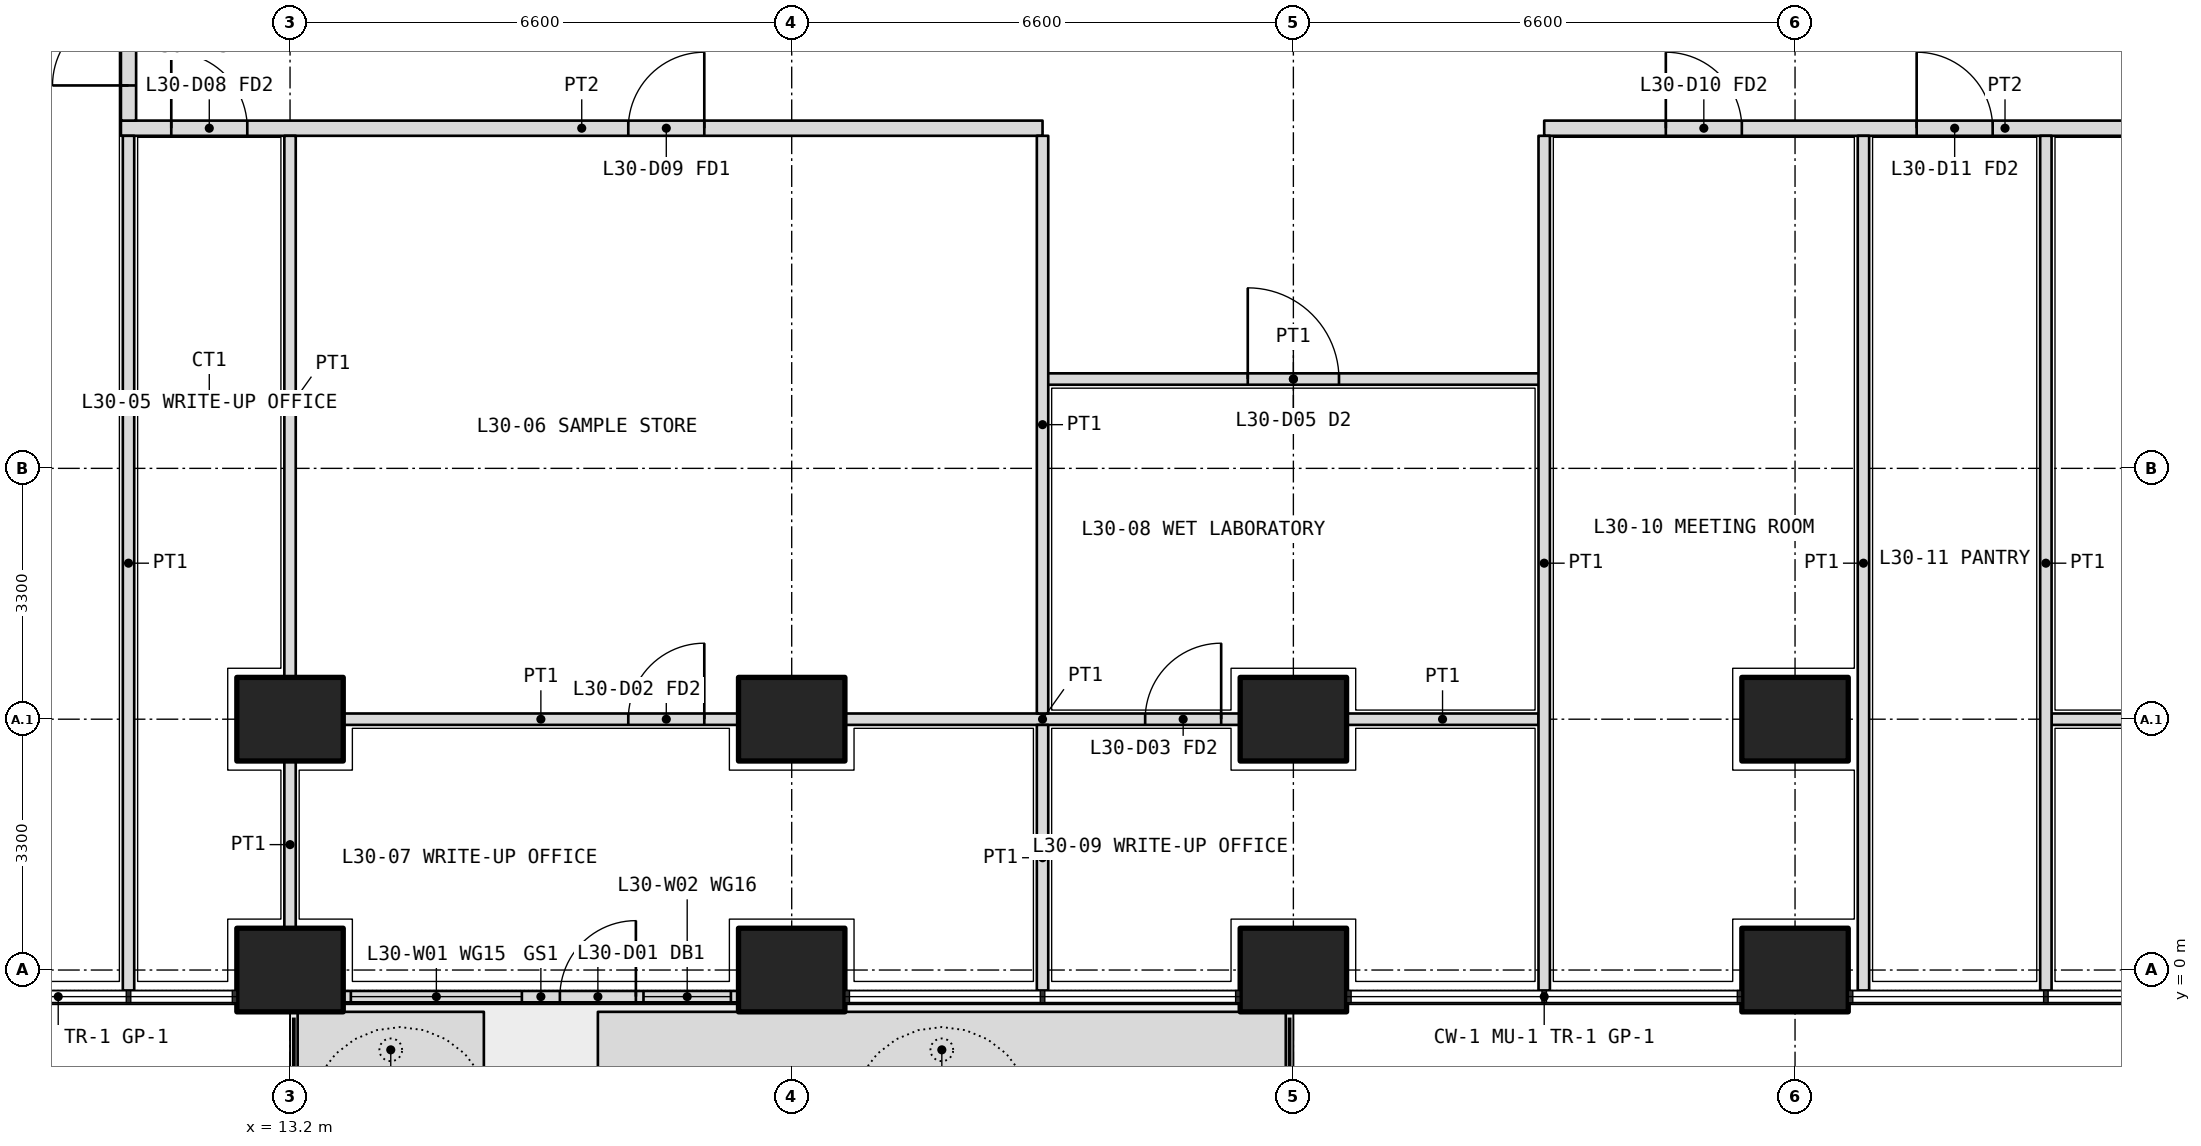
"""IFC4 building model, lengths in metres.
Left out: names, types, materials, properties, quantities, classifications, styles, units other than length and angle.
Written with IfcOpenShell. Run it as: python <this file> out.ifc"""

import sys

from ifc_helpers import new_model, si_unit, direction, frame, frame_2d, origin, origin_2d, place, context, subcontext, project, spatial, polyline, rectangle, outline, extrude, element, fill, save


model = new_model("IFC4")
c1 = context("Model", 3, precision=1e-05, world=origin(), true_north=direction((0.0, 1.0)))
c2 = subcontext(c1, "Body", "Model", "MODEL_VIEW")
j1 = project(units=[si_unit("LENGTHUNIT", "METRE"), si_unit("PLANEANGLEUNIT", "RADIAN")], contexts=[c1])
p1 = place(None, origin())
s1 = spatial("IfcSite", under=j1, at=p1, CompositionType="ELEMENT")
p2 = place(p1, origin())
s2 = spatial("IfcBuilding", under=s1, at=p2, CompositionType="ELEMENT")
p3 = place(p2, frame((0.0, 0.0, 132.6)))
s3 = spatial("IfcBuildingStorey", under=s2, at=p3, CompositionType="ELEMENT", Elevation=132.6)
for number, where, z_axis, x_axis in (
    (1, (13.2, 0.0, 0.0), (0.0, 0.0, 1.0), (1.0, 0.0, 0.0)),
    (2, (19.8, 0.0, 0.0), (0.0, 0.0, 1.0), (1.0, 0.0, 0.0)),
    (3, (26.4, 0.0, 0.0), (0.0, 0.0, 1.0), (1.0, 0.0, 0.0)),
    (4, (33.0, 0.0, 0.0), (0.0, 0.0, 1.0), (1.0, 0.0, 0.0)),
    (5, (13.2, 3.3, 0.0), (0.0, 0.0, 1.0), (1.0, 0.0, 0.0)),
    (6, (19.8, 3.3, 0.0), (0.0, 0.0, 1.0), (1.0, 0.0, 0.0)),
    (7, (26.4, 3.3, 0.0), (0.0, 0.0, 1.0), (1.0, 0.0, 0.0)),
    (8, (33.0, 3.3, 0.0), (0.0, 0.0, 1.0), (1.0, 0.0, 0.0)),
):
    element("IfcColumn", number, at=place(p3, frame(where, z_axis=z_axis, x_axis=x_axis)), inside=s3, PredefinedType="COLUMN", context=c2, shape_type="SweptSolid", body=[
        extrude(rectangle(XDim=1.4, YDim=1.1, at=origin_2d()), origin(), (0.0, 0.0, 1.0), 4.2),
    ])
p4 = place(p3, origin())
e9 = element("IfcWall", 9, at=p4, inside=s3, PredefinedType="USERDEFINED", context=c2, shape_type="SweptSolid", body=[
    extrude(outline(polyline([(13.3, -1.55), (15.75, -1.55), (15.75, -0.55), (13.3, -0.55), (13.3, -1.55)]), holes=[polyline([(13.45, -1.4), (15.6, -1.4), (15.6, -0.7), (13.45, -0.7), (13.45, -1.4)])]), origin(), (0.0, 0.0, 1.0), 1.05),
])
p5 = place(p3, origin())
e10 = element("IfcWall", 10, at=p5, inside=s3, PredefinedType="USERDEFINED", context=c2, shape_type="SweptSolid", body=[
    extrude(outline(polyline([(17.25, -1.55), (26.3, -1.55), (26.3, -0.55), (17.25, -0.55), (17.25, -1.55)]), holes=[polyline([(17.4, -1.4), (26.15, -1.4), (26.15, -0.7), (17.4, -0.7), (17.4, -1.4)])]), origin(), (0.0, 0.0, 1.0), 1.05),
])
p6 = place(p3, frame((13.9, -0.35, 0.0), z_axis=(0.0, 0.0, 1.0), x_axis=(1.0, 0.0, 0.0)))
e11 = element("IfcWall", 11, at=p6, inside=s3, PredefinedType="SOLIDWALL", context=c2, shape_type="SweptSolid", body=[
    extrude(rectangle(XDim=5.2, YDim=0.15, at=frame_2d((2.6, 0.0))), origin(), (0.0, 0.0, 1.0), 2.7),
])
p7 = place(p6, frame((2.85, 0.0, 0.0)))
e12 = element("IfcOpeningElement", 12, at=p7, cuts=e11, PredefinedType="OPENING", context=c2, shape_type="SweptSolid", body=[
    extrude(rectangle(XDim=1.0, YDim=2.4, at=frame_2d((0.5, 1.2))), frame((0.0, 0.085, 0.0), z_axis=(0.0, -1.0, 0.0), x_axis=(1.0, 0.0, 0.0)), (0.0, 0.0, 1.0), 0.17),
])
p8 = place(p6, frame((0.1, 0.0, 0.1)))
e13 = element("IfcOpeningElement", 13, at=p8, cuts=e11, PredefinedType="OPENING", context=c2, shape_type="SweptSolid", body=[
    extrude(rectangle(XDim=2.25, YDim=2.3, at=frame_2d((1.125, 1.15))), frame((0.0, 0.085, 0.0), z_axis=(0.0, -1.0, 0.0), x_axis=(1.0, 0.0, 0.0)), (0.0, 0.0, 1.0), 0.17),
])
p9 = place(p6, frame((3.95, 0.0, 0.1)))
e14 = element("IfcOpeningElement", 14, at=p9, cuts=e11, PredefinedType="OPENING", context=c2, shape_type="SweptSolid", body=[
    extrude(rectangle(XDim=1.15, YDim=2.3, at=frame_2d((0.575, 1.15))), frame((0.0, 0.085, 0.0), z_axis=(0.0, -1.0, 0.0), x_axis=(1.0, 0.0, 0.0)), (0.0, 0.0, 1.0), 0.17),
])
p10 = place(p3, frame((10.975, 11.075, 0.0), z_axis=(0.0, 0.0, 1.0), x_axis=(1.0, 0.0, 0.0)))
e15 = element("IfcWall", 15, at=p10, inside=s3, PredefinedType="PARTITIONING", context=c2, shape_type="SweptSolid", body=[
    extrude(rectangle(XDim=12.125, YDim=0.2, at=frame_2d((6.062, 0.0))), origin(), (0.0, 0.0, 1.0), 2.85),
])
p11 = place(p10, frame((0.663, 0.0, 0.0)))
e16 = element("IfcOpeningElement", 16, at=p11, cuts=e15, PredefinedType="OPENING", context=c2, shape_type="SweptSolid", body=[
    extrude(rectangle(XDim=1.0, YDim=2.1, at=frame_2d((0.5, 1.05))), frame((0.0, 0.11, 0.0), z_axis=(0.0, -1.0, 0.0), x_axis=(1.0, 0.0, 0.0)), (0.0, 0.0, 1.0), 0.22),
])
p12 = place(p10, frame((6.675, 0.0, 0.0)))
e17 = element("IfcOpeningElement", 17, at=p12, cuts=e15, PredefinedType="OPENING", context=c2, shape_type="SweptSolid", body=[
    extrude(rectangle(XDim=1.0, YDim=2.1, at=frame_2d((0.5, 1.05))), frame((0.0, 0.11, 0.0), z_axis=(0.0, -1.0, 0.0), x_axis=(1.0, 0.0, 0.0)), (0.0, 0.0, 1.0), 0.22),
])
p13 = place(p3, frame((29.7, 11.075, 0.0), z_axis=(0.0, 0.0, 1.0), x_axis=(1.0, 0.0, 0.0)))
e18 = element("IfcWall", 18, at=p13, inside=s3, PredefinedType="PARTITIONING", context=c2, shape_type="SweptSolid", body=[
    extrude(rectangle(XDim=12.125, YDim=0.2, at=frame_2d((6.062, 0.0))), origin(), (0.0, 0.0, 1.0), 2.85),
])
p14 = place(p13, frame((1.6, 0.0, 0.0)))
e19 = element("IfcOpeningElement", 19, at=p14, cuts=e18, PredefinedType="OPENING", context=c2, shape_type="SweptSolid", body=[
    extrude(rectangle(XDim=1.0, YDim=2.1, at=frame_2d((0.5, 1.05))), frame((0.0, 0.11, 0.0), z_axis=(0.0, -1.0, 0.0), x_axis=(1.0, 0.0, 0.0)), (0.0, 0.0, 1.0), 0.22),
])
p15 = place(p13, frame((4.9, 0.0, 0.0)))
e20 = element("IfcOpeningElement", 20, at=p15, cuts=e18, PredefinedType="OPENING", context=c2, shape_type="SweptSolid", body=[
    extrude(rectangle(XDim=1.0, YDim=2.1, at=frame_2d((0.5, 1.05))), frame((0.0, 0.11, 0.0), z_axis=(0.0, -1.0, 0.0), x_axis=(1.0, 0.0, 0.0)), (0.0, 0.0, 1.0), 0.22),
])
p16 = place(p13, frame((8.812, 0.0, 0.0)))
e21 = element("IfcOpeningElement", 21, at=p16, cuts=e18, PredefinedType="OPENING", context=c2, shape_type="SweptSolid", body=[
    extrude(rectangle(XDim=1.0, YDim=2.1, at=frame_2d((0.5, 1.05))), frame((0.0, 0.11, 0.0), z_axis=(0.0, -1.0, 0.0), x_axis=(1.0, 0.0, 0.0)), (0.0, 0.0, 1.0), 0.22),
])
p17 = place(p3, frame((11.075, 11.175, 0.0), z_axis=(0.0, 0.0, 1.0), x_axis=(0.0, 1.0, 0.0)))
e22 = element("IfcWall", 22, at=p17, inside=s3, PredefinedType="PARTITIONING", context=c2, shape_type="SweptSolid", body=[
    extrude(rectangle(XDim=27.625, YDim=0.2, at=frame_2d((13.812, 0.0))), origin(), (0.0, 0.0, 1.0), 2.85),
])
p18 = place(p17, frame((0.462, 0.0, 0.0)))
e23 = element("IfcOpeningElement", 23, at=p18, cuts=e22, PredefinedType="OPENING", context=c2, shape_type="SweptSolid", body=[
    extrude(rectangle(XDim=1.0, YDim=2.1, at=frame_2d((0.5, 1.05))), frame((0.0, 0.11, 0.0), z_axis=(0.0, -1.0, 0.0), x_axis=(1.0, 0.0, 0.0)), (0.0, 0.0, 1.0), 0.22),
])
p19 = place(p17, frame((2.575, 0.0, 0.0)))
e24 = element("IfcOpeningElement", 24, at=p19, cuts=e22, PredefinedType="OPENING", context=c2, shape_type="SweptSolid", body=[
    extrude(rectangle(XDim=1.0, YDim=2.1, at=frame_2d((0.5, 1.05))), frame((0.0, 0.11, 0.0), z_axis=(0.0, -1.0, 0.0), x_axis=(1.0, 0.0, 0.0)), (0.0, 0.0, 1.0), 0.22),
])
p20 = place(p17, frame((5.625, 0.0, 0.0)))
e25 = element("IfcOpeningElement", 25, at=p20, cuts=e22, PredefinedType="OPENING", context=c2, shape_type="SweptSolid", body=[
    extrude(rectangle(XDim=0.9, YDim=2.1, at=frame_2d((0.45, 1.05))), frame((0.0, 0.11, 0.0), z_axis=(0.0, -1.0, 0.0), x_axis=(1.0, 0.0, 0.0)), (0.0, 0.0, 1.0), 0.22),
])
p21 = place(p17, frame((9.425, 0.0, 0.0)))
e26 = element("IfcOpeningElement", 26, at=p21, cuts=e22, PredefinedType="OPENING", context=c2, shape_type="SweptSolid", body=[
    extrude(rectangle(XDim=0.9, YDim=2.1, at=frame_2d((0.45, 1.05))), frame((0.0, 0.11, 0.0), z_axis=(0.0, -1.0, 0.0), x_axis=(1.0, 0.0, 0.0)), (0.0, 0.0, 1.0), 0.22),
])
p22 = place(p17, frame((12.975, 0.0, 0.0)))
e27 = element("IfcOpeningElement", 27, at=p22, cuts=e22, PredefinedType="OPENING", context=c2, shape_type="SweptSolid", body=[
    extrude(rectangle(XDim=1.0, YDim=2.1, at=frame_2d((0.5, 1.05))), frame((0.0, 0.11, 0.0), z_axis=(0.0, -1.0, 0.0), x_axis=(1.0, 0.0, 0.0)), (0.0, 0.0, 1.0), 0.22),
])
p23 = place(p17, frame((19.675, 0.0, 0.0)))
e28 = element("IfcOpeningElement", 28, at=p23, cuts=e22, PredefinedType="OPENING", context=c2, shape_type="SweptSolid", body=[
    extrude(rectangle(XDim=1.0, YDim=2.1, at=frame_2d((0.5, 1.05))), frame((0.0, 0.11, 0.0), z_axis=(0.0, -1.0, 0.0), x_axis=(1.0, 0.0, 0.0)), (0.0, 0.0, 1.0), 0.22),
])
p24 = place(p17, frame((25.925, 0.0, 0.0)))
e29 = element("IfcOpeningElement", 29, at=p24, cuts=e22, PredefinedType="OPENING", context=c2, shape_type="SweptSolid", body=[
    extrude(rectangle(XDim=1.0, YDim=2.1, at=frame_2d((0.5, 1.05))), frame((0.0, 0.11, 0.0), z_axis=(0.0, -1.0, 0.0), x_axis=(1.0, 0.0, 0.0)), (0.0, 0.0, 1.0), 0.22),
])
p25 = place(p3, frame((11.075, -0.27, 0.0), z_axis=(0.0, 0.0, 1.0), x_axis=(0.0, 1.0, 0.0)))
e30 = element("IfcWall", 30, at=p25, inside=s3, PredefinedType="PARTITIONING", context=c2, shape_type="SweptSolid", body=[
    extrude(rectangle(XDim=11.245, YDim=0.15, at=frame_2d((5.623, 0.0))), origin(), (0.0, 0.0, 1.0), 2.7),
])
p26 = place(p3, frame((13.9, 3.3, 0.0), z_axis=(0.0, 0.0, 1.0), x_axis=(1.0, 0.0, 0.0)))
e31 = element("IfcWall", 31, at=p26, inside=s3, PredefinedType="PARTITIONING", context=c2, shape_type="SweptSolid", body=[
    extrude(rectangle(XDim=5.2, YDim=0.15, at=frame_2d((2.6, 0.0))), origin(), (0.0, 0.0, 1.0), 2.85),
])
p27 = place(p26, frame((3.75, 0.0, 0.0)))
e32 = element("IfcOpeningElement", 32, at=p27, cuts=e31, PredefinedType="OPENING", context=c2, shape_type="SweptSolid", body=[
    extrude(rectangle(XDim=1.0, YDim=2.1, at=frame_2d((0.5, 1.05))), frame((0.0, 0.085, 0.0), z_axis=(0.0, -1.0, 0.0), x_axis=(1.0, 0.0, 0.0)), (0.0, 0.0, 1.0), 0.17),
])
p28 = place(p3, frame((20.5, 3.3, 0.0), z_axis=(0.0, 0.0, 1.0), x_axis=(1.0, 0.0, 0.0)))
e33 = element("IfcWall", 33, at=p28, inside=s3, PredefinedType="PARTITIONING", context=c2, shape_type="SweptSolid", body=[
    extrude(rectangle(XDim=5.2, YDim=0.15, at=frame_2d((2.6, 0.0))), origin(), (0.0, 0.0, 1.0), 2.85),
])
p29 = place(p28, frame((3.95, 0.0, 0.0)))
e34 = element("IfcOpeningElement", 34, at=p29, cuts=e33, PredefinedType="OPENING", context=c2, shape_type="SweptSolid", body=[
    extrude(rectangle(XDim=1.0, YDim=2.1, at=frame_2d((0.5, 1.05))), frame((0.0, 0.085, 0.0), z_axis=(0.0, -1.0, 0.0), x_axis=(1.0, 0.0, 0.0)), (0.0, 0.0, 1.0), 0.17),
])
for number, where, z_axis, x_axis in (
    (35, (27.1, 3.3, 0.0), (0.0, 0.0, 1.0), (1.0, 0.0, 0.0)),
    (36, (36.375, 3.3, 0.0), (0.0, 0.0, 1.0), (1.0, 0.0, 0.0)),
):
    element("IfcWall", number, at=place(p3, frame(where, z_axis=z_axis, x_axis=x_axis)), inside=s3, PredefinedType="PARTITIONING", context=c2, shape_type="SweptSolid", body=[
        extrude(rectangle(XDim=2.525, YDim=0.15, at=frame_2d((1.262, 0.0))), origin(), (0.0, 0.0, 1.0), 2.85),
    ])
p30 = place(p3, frame((23.1, 7.775, 0.0), z_axis=(0.0, 0.0, 1.0), x_axis=(1.0, 0.0, 0.0)))
e37 = element("IfcWall", 37, at=p30, inside=s3, PredefinedType="PARTITIONING", context=c2, shape_type="SweptSolid", body=[
    extrude(rectangle(XDim=6.6, YDim=0.15, at=frame_2d((3.3, 0.0))), origin(), (0.0, 0.0, 1.0), 2.85),
])
p31 = place(p30, frame((2.7, 0.0, 0.0)))
e38 = element("IfcOpeningElement", 38, at=p31, cuts=e37, PredefinedType="OPENING", context=c2, shape_type="SweptSolid", body=[
    extrude(rectangle(XDim=1.2, YDim=2.1, at=frame_2d((0.6, 1.05))), frame((0.0, 0.085, 0.0), z_axis=(0.0, -1.0, 0.0), x_axis=(1.0, 0.0, 0.0)), (0.0, 0.0, 1.0), 0.17),
])
for number, where, z_axis, x_axis in (
    (39, (33.9, -0.27, 0.0), (0.0, 0.0, 1.0), (0.0, 1.0, 0.0)),
    (40, (36.3, -0.27, 0.0), (0.0, 0.0, 1.0), (0.0, 1.0, 0.0)),
):
    element("IfcWall", number, at=place(p3, frame(where, z_axis=z_axis, x_axis=x_axis)), inside=s3, PredefinedType="PARTITIONING", context=c2, shape_type="SweptSolid", body=[
        extrude(rectangle(XDim=11.245, YDim=0.15, at=frame_2d((5.623, 0.0))), origin(), (0.0, 0.0, 1.0), 2.7),
    ])
p32 = place(p3, frame((13.2, 0.55, 0.0), z_axis=(0.0, 0.0, 1.0), x_axis=(0.0, 1.0, 0.0)))
e41 = element("IfcWall", 41, at=p32, inside=s3, PredefinedType="PARTITIONING", context=c2, shape_type="SweptSolid", body=[
    extrude(rectangle(XDim=2.2, YDim=0.15, at=frame_2d((1.1, 0.0))), origin(), (0.0, 0.0, 1.0), 2.85),
])
p33 = place(p3, frame((13.2, 3.85, 0.0), z_axis=(0.0, 0.0, 1.0), x_axis=(0.0, 1.0, 0.0)))
e42 = element("IfcWall", 42, at=p33, inside=s3, PredefinedType="PARTITIONING", context=c2, shape_type="SweptSolid", body=[
    extrude(rectangle(XDim=7.125, YDim=0.15, at=frame_2d((3.562, 0.0))), origin(), (0.0, 0.0, 1.0), 2.85),
])
p34 = place(p3, frame((23.1, -0.27, 0.0), z_axis=(0.0, 0.0, 1.0), x_axis=(0.0, 1.0, 0.0)))
e43 = element("IfcWall", 43, at=p34, inside=s3, PredefinedType="PARTITIONING", context=c2, shape_type="SweptSolid", body=[
    extrude(rectangle(XDim=3.495, YDim=0.15, at=frame_2d((1.748, 0.0))), origin(), (0.0, 0.0, 1.0), 2.7),
])
p35 = place(p3, frame((23.1, 3.375, 0.0), z_axis=(0.0, 0.0, 1.0), x_axis=(0.0, 1.0, 0.0)))
e44 = element("IfcWall", 44, at=p35, inside=s3, PredefinedType="PARTITIONING", context=c2, shape_type="SweptSolid", body=[
    extrude(rectangle(XDim=7.6, YDim=0.15, at=frame_2d((3.8, 0.0))), origin(), (0.0, 0.0, 1.0), 3.9),
])
p36 = place(p3, frame((29.7, -0.27, 0.0), z_axis=(0.0, 0.0, 1.0), x_axis=(0.0, 1.0, 0.0)))
e45 = element("IfcWall", 45, at=p36, inside=s3, PredefinedType="PARTITIONING", context=c2, shape_type="SweptSolid", body=[
    extrude(rectangle(XDim=11.245, YDim=0.15, at=frame_2d((5.623, 0.0))), origin(), (0.0, 0.0, 1.0), 2.7),
])
p37 = place(p7, origin())
e46 = element("IfcDoor", 46, at=p37, inside=s3, OperationType="SINGLE_SWING_RIGHT", PredefinedType="DOOR", context=c2, shape_type="SweptSolid", body=[
    extrude(rectangle(XDim=1.0, YDim=2.4, at=frame_2d((0.5, 1.2))), frame((0.0, 0.025, 0.0), z_axis=(0.0, -1.0, 0.0), x_axis=(1.0, 0.0, 0.0)), (0.0, 0.0, 1.0), 0.05),
])
fill(e12, e46)
p38 = place(p8, origin())
e47 = element("IfcWindow", 47, at=p38, inside=s3, PartitioningType="SINGLE_PANEL", PredefinedType="WINDOW", context=c2, shape_type="SweptSolid", body=[
    extrude(rectangle(XDim=2.25, YDim=2.3, at=frame_2d((1.125, 1.15))), frame((0.0, 0.03, 0.0), z_axis=(0.0, -1.0, 0.0), x_axis=(1.0, 0.0, 0.0)), (0.0, 0.0, 1.0), 0.06),
])
fill(e13, e47)
p39 = place(p9, origin())
e48 = element("IfcWindow", 48, at=p39, inside=s3, PartitioningType="SINGLE_PANEL", PredefinedType="WINDOW", context=c2, shape_type="SweptSolid", body=[
    extrude(rectangle(XDim=1.15, YDim=2.3, at=frame_2d((0.575, 1.15))), frame((0.0, 0.03, 0.0), z_axis=(0.0, -1.0, 0.0), x_axis=(1.0, 0.0, 0.0)), (0.0, 0.0, 1.0), 0.06),
])
fill(e14, e48)
p40 = place(p11, origin())
e49 = element("IfcDoor", 49, at=p40, inside=s3, OperationType="SINGLE_SWING_LEFT", PredefinedType="DOOR", context=c2, shape_type="SweptSolid", body=[
    extrude(rectangle(XDim=1.0, YDim=2.1, at=frame_2d((0.5, 1.05))), frame((0.0, 0.025, 0.0), z_axis=(0.0, -1.0, 0.0), x_axis=(1.0, 0.0, 0.0)), (0.0, 0.0, 1.0), 0.05),
])
fill(e16, e49)
p41 = place(p12, origin())
e50 = element("IfcDoor", 50, at=p41, inside=s3, OperationType="SINGLE_SWING_RIGHT", PredefinedType="DOOR", context=c2, shape_type="SweptSolid", body=[
    extrude(rectangle(XDim=1.0, YDim=2.1, at=frame_2d((0.5, 1.05))), frame((0.0, 0.025, 0.0), z_axis=(0.0, -1.0, 0.0), x_axis=(1.0, 0.0, 0.0)), (0.0, 0.0, 1.0), 0.05),
])
fill(e17, e50)
p42 = place(p27, origin())
e51 = element("IfcDoor", 51, at=p42, inside=s3, OperationType="SINGLE_SWING_RIGHT", PredefinedType="DOOR", context=c2, shape_type="SweptSolid", body=[
    extrude(rectangle(XDim=1.0, YDim=2.1, at=frame_2d((0.5, 1.05))), frame((0.0, 0.025, 0.0), z_axis=(0.0, -1.0, 0.0), x_axis=(1.0, 0.0, 0.0)), (0.0, 0.0, 1.0), 0.05),
])
fill(e32, e51)
p43 = place(p31, origin())
e52 = element("IfcDoor", 52, at=p43, inside=s3, OperationType="DOUBLE_DOOR_SINGLE_SWING", PredefinedType="DOOR", context=c2, shape_type="SweptSolid", body=[
    extrude(rectangle(XDim=1.2, YDim=2.1, at=frame_2d((0.6, 1.05))), frame((0.0, 0.025, 0.0), z_axis=(0.0, -1.0, 0.0), x_axis=(1.0, 0.0, 0.0)), (0.0, 0.0, 1.0), 0.05),
])
fill(e38, e52)
p44 = place(p29, origin())
e53 = element("IfcDoor", 53, at=p44, inside=s3, OperationType="SINGLE_SWING_RIGHT", PredefinedType="DOOR", context=c2, shape_type="SweptSolid", body=[
    extrude(rectangle(XDim=1.0, YDim=2.1, at=frame_2d((0.5, 1.05))), frame((0.0, 0.025, 0.0), z_axis=(0.0, -1.0, 0.0), x_axis=(1.0, 0.0, 0.0)), (0.0, 0.0, 1.0), 0.05),
])
fill(e34, e53)
p45 = place(p14, origin())
e54 = element("IfcDoor", 54, at=p45, inside=s3, OperationType="SINGLE_SWING_LEFT", PredefinedType="DOOR", context=c2, shape_type="SweptSolid", body=[
    extrude(rectangle(XDim=1.0, YDim=2.1, at=frame_2d((0.5, 1.05))), frame((0.0, 0.025, 0.0), z_axis=(0.0, -1.0, 0.0), x_axis=(1.0, 0.0, 0.0)), (0.0, 0.0, 1.0), 0.05),
])
fill(e19, e54)
p46 = place(p15, origin())
e55 = element("IfcDoor", 55, at=p46, inside=s3, OperationType="SINGLE_SWING_LEFT", PredefinedType="DOOR", context=c2, shape_type="SweptSolid", body=[
    extrude(rectangle(XDim=1.0, YDim=2.1, at=frame_2d((0.5, 1.05))), frame((0.0, 0.025, 0.0), z_axis=(0.0, -1.0, 0.0), x_axis=(1.0, 0.0, 0.0)), (0.0, 0.0, 1.0), 0.05),
])
fill(e20, e55)
p47 = place(p18, origin())
e56 = element("IfcDoor", 56, at=p47, inside=s3, OperationType="SINGLE_SWING_LEFT", PredefinedType="DOOR", context=c2, shape_type="SweptSolid", body=[
    extrude(rectangle(XDim=1.0, YDim=2.1, at=frame_2d((0.5, 1.05))), frame((0.0, 0.025, 0.0), z_axis=(0.0, -1.0, 0.0), x_axis=(1.0, 0.0, 0.0)), (0.0, 0.0, 1.0), 0.05),
])
fill(e23, e56)
save(model, sys.argv[1])
